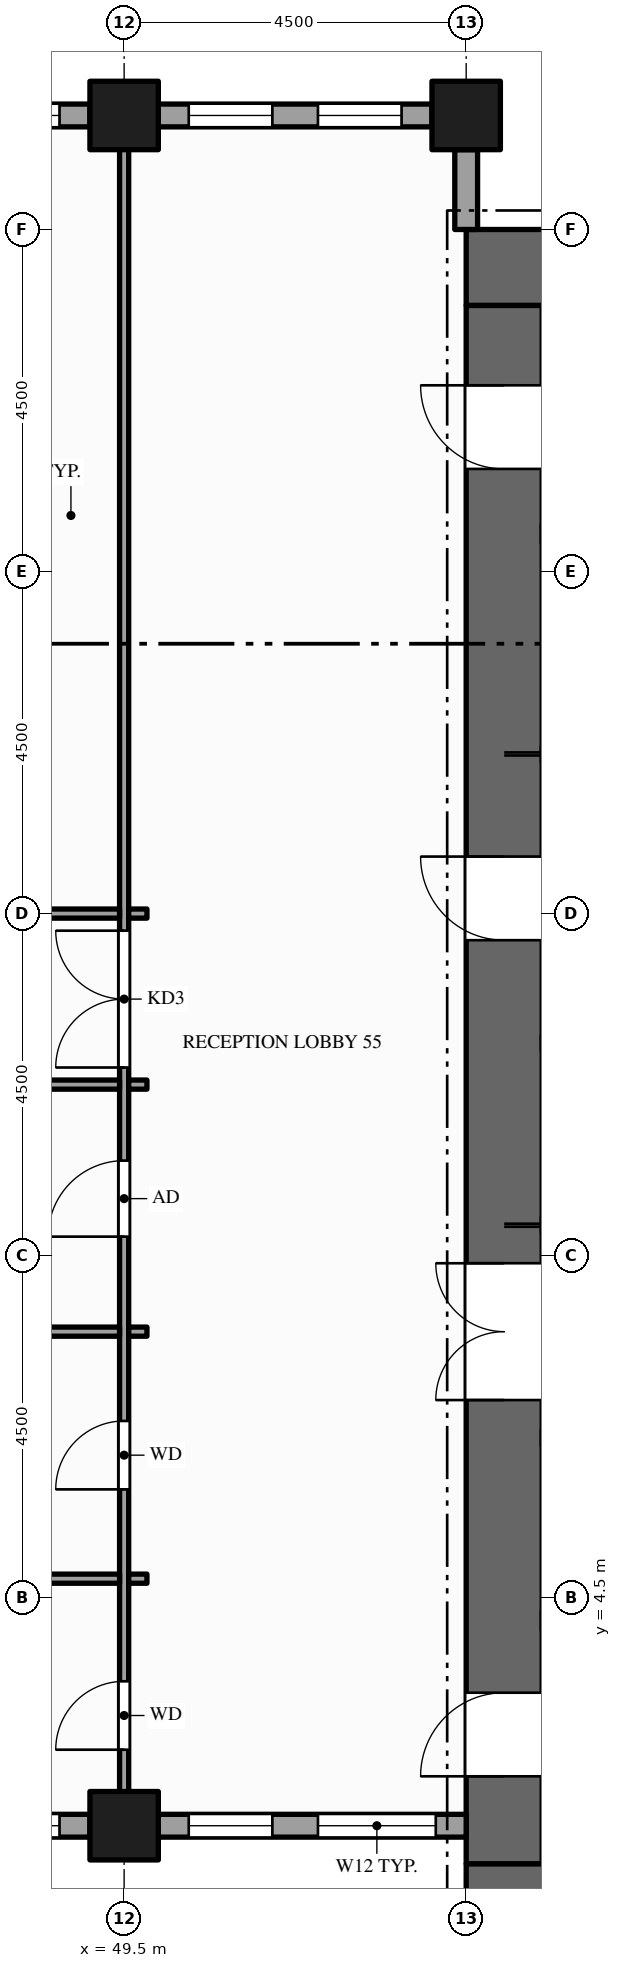
"""IFC4 building model, lengths in metres.
Left out: names, types, materials, properties, quantities, classifications, styles, units other than length and angle.
Written with IfcOpenShell. Run it as: python <this file> out.ifc"""

import sys

from ifc_helpers import new_model, si_unit, direction, frame, frame_2d, origin, origin_2d, place, context, subcontext, project, spatial, rectangle, hollow_rectangle, extrude, element, fill, save


model = new_model("IFC4")
c1 = context("Model", 3, precision=1e-05, world=origin(), true_north=direction((0.0, 1.0)))
c2 = subcontext(c1, "Body", "Model", "MODEL_VIEW")
j1 = project(units=[si_unit("LENGTHUNIT", "METRE"), si_unit("PLANEANGLEUNIT", "RADIAN")], contexts=[c1])
p1 = place(None, origin())
s1 = spatial("IfcSite", under=j1, at=p1, CompositionType="ELEMENT")
p2 = place(p1, origin())
s2 = spatial("IfcBuilding", under=s1, at=p2, CompositionType="ELEMENT")
p3 = place(p2, frame((0.0, 0.0, 155.0)))
s3 = spatial("IfcBuildingStorey", under=s2, at=p3, CompositionType="ELEMENT", Elevation=155.0)
for number, where, z_axis, x_axis in (
    (1, (67.5, 0.5, -0.15), (0.0, 0.0, 1.0), (-1.0, 0.0, 0.0)),
    (2, (54.0, 22.0, -0.15), (0.0, 0.0, 1.0), (1.0, 0.0, 0.0)),
):
    element("IfcWall", number, at=place(p3, frame(where, z_axis=z_axis, x_axis=x_axis)), inside=s3, PredefinedType="SHEAR", context=c2, shape_type="SweptSolid", body=[
        extrude(rectangle(XDim=13.5, YDim=1.0, at=frame_2d((6.75, 0.0))), origin(), (0.0, 0.0, 1.0), 4.0),
    ])
p4 = place(p3, frame((54.5, 1.0, -0.15), z_axis=(0.0, 0.0, 1.0), x_axis=(0.0, 1.0, 0.0)))
e3 = element("IfcWall", 3, at=p4, inside=s3, PredefinedType="SHEAR", context=c2, shape_type="SweptSolid", body=[
    extrude(rectangle(XDim=20.5, YDim=1.0, at=frame_2d((10.25, 0.0))), origin(), (0.0, 0.0, 1.0), 4.0),
])
p5 = place(p4, frame((6.1, 0.0, 0.15)))
e4 = element("IfcOpeningElement", 4, at=p5, cuts=e3, PredefinedType="OPENING", context=c2, shape_type="SweptSolid", body=[
    extrude(rectangle(XDim=1.8, YDim=2.1, at=frame_2d((0.9, 1.05))), frame((0.0, 0.51, 0.0), z_axis=(0.0, -1.0, 0.0), x_axis=(1.0, 0.0, 0.0)), (0.0, 0.0, 1.0), 1.02),
])
p6 = place(p4, frame((12.15, 0.0, 0.15)))
e5 = element("IfcOpeningElement", 5, at=p6, cuts=e3, PredefinedType="OPENING", context=c2, shape_type="SweptSolid", body=[
    extrude(rectangle(XDim=1.1, YDim=2.1, at=frame_2d((0.55, 1.05))), frame((0.0, 0.51, 0.0), z_axis=(0.0, -1.0, 0.0), x_axis=(1.0, 0.0, 0.0)), (0.0, 0.0, 1.0), 1.02),
])
p7 = place(p4, frame((1.15, 0.0, 0.15)))
e6 = element("IfcOpeningElement", 6, at=p7, cuts=e3, PredefinedType="OPENING", context=c2, shape_type="SweptSolid", body=[
    extrude(rectangle(XDim=1.1, YDim=2.1, at=frame_2d((0.55, 1.05))), frame((0.0, 0.51, 0.0), z_axis=(0.0, -1.0, 0.0), x_axis=(1.0, 0.0, 0.0)), (0.0, 0.0, 1.0), 1.02),
])
p8 = place(p4, frame((18.35, 0.0, 0.15)))
e7 = element("IfcOpeningElement", 7, at=p8, cuts=e3, PredefinedType="OPENING", context=c2, shape_type="SweptSolid", body=[
    extrude(rectangle(XDim=1.1, YDim=2.1, at=frame_2d((0.55, 1.05))), frame((0.0, 0.51, 0.0), z_axis=(0.0, -1.0, 0.0), x_axis=(1.0, 0.0, 0.0)), (0.0, 0.0, 1.0), 1.02),
])
for number, where, z_axis, x_axis in (
    (8, (49.5, 1.5, -0.15), (0.0, 0.0, 1.0), (1.0, 0.0, 0.0)),
    (9, (49.5, 24.0, -0.15), (0.0, 0.0, 1.0), (1.0, 0.0, 0.0)),
    (10, (54.0, 24.0, -0.15), (0.0, 0.0, 1.0), (1.0, 0.0, 0.0)),
):
    element("IfcColumn", number, at=place(p3, frame(where, z_axis=z_axis, x_axis=x_axis)), inside=s3, PredefinedType="COLUMN", context=c2, shape_type="SweptSolid", body=[
        extrude(hollow_rectangle(XDim=0.9, YDim=0.9, WallThickness=0.045, at=origin_2d()), origin(), (0.0, 0.0, 1.0), 4.0),
    ])
p9 = place(p3, frame((45.45, 1.5, 0.0), z_axis=(0.0, 0.0, 1.0), x_axis=(1.0, 0.0, 0.0)))
e11 = element("IfcWall", 11, at=p9, inside=s3, PredefinedType="STANDARD", context=c2, shape_type="SweptSolid", body=[
    extrude(rectangle(XDim=3.6, YDim=0.3, at=frame_2d((1.8, 0.0))), origin(), (0.0, 0.0, 1.0), 2.87),
])
p10 = place(p9, frame((0.4, 0.0, 0.9)))
e12 = element("IfcOpeningElement", 12, at=p10, cuts=e11, PredefinedType="OPENING", context=c2, shape_type="SweptSolid", body=[
    extrude(rectangle(XDim=1.1, YDim=1.75, at=frame_2d((0.55, 0.875))), frame((0.0, 0.16, 0.0), z_axis=(0.0, -1.0, 0.0), x_axis=(1.0, 0.0, 0.0)), (0.0, 0.0, 1.0), 0.32),
])
p11 = place(p9, frame((2.1, 0.0, 0.9)))
e13 = element("IfcOpeningElement", 13, at=p11, cuts=e11, PredefinedType="OPENING", context=c2, shape_type="SweptSolid", body=[
    extrude(rectangle(XDim=1.1, YDim=1.75, at=frame_2d((0.55, 0.875))), frame((0.0, 0.16, 0.0), z_axis=(0.0, -1.0, 0.0), x_axis=(1.0, 0.0, 0.0)), (0.0, 0.0, 1.0), 0.32),
])
p12 = place(p3, frame((49.95, 1.5, 0.0), z_axis=(0.0, 0.0, 1.0), x_axis=(1.0, 0.0, 0.0)))
e14 = element("IfcWall", 14, at=p12, inside=s3, PredefinedType="STANDARD", context=c2, shape_type="SweptSolid", body=[
    extrude(rectangle(XDim=4.05, YDim=0.3, at=frame_2d((2.025, 0.0))), origin(), (0.0, 0.0, 1.0), 2.87),
])
p13 = place(p12, frame((0.4, 0.0, 0.9)))
e15 = element("IfcOpeningElement", 15, at=p13, cuts=e14, PredefinedType="OPENING", context=c2, shape_type="SweptSolid", body=[
    extrude(rectangle(XDim=1.1, YDim=1.75, at=frame_2d((0.55, 0.875))), frame((0.0, 0.16, 0.0), z_axis=(0.0, -1.0, 0.0), x_axis=(1.0, 0.0, 0.0)), (0.0, 0.0, 1.0), 0.32),
])
p14 = place(p12, frame((2.1, 0.0, 0.9)))
e16 = element("IfcOpeningElement", 16, at=p14, cuts=e14, PredefinedType="OPENING", context=c2, shape_type="SweptSolid", body=[
    extrude(rectangle(XDim=1.55, YDim=1.75, at=frame_2d((0.775, 0.875))), frame((0.0, 0.16, 0.0), z_axis=(0.0, -1.0, 0.0), x_axis=(1.0, 0.0, 0.0)), (0.0, 0.0, 1.0), 0.32),
])
p15 = place(p3, frame((54.0, 22.5, 0.0), z_axis=(0.0, 0.0, 1.0), x_axis=(0.0, 1.0, 0.0)))
e17 = element("IfcWall", 17, at=p15, inside=s3, PredefinedType="STANDARD", context=c2, shape_type="SweptSolid", body=[
    extrude(rectangle(XDim=1.05, YDim=0.3, at=frame_2d((0.525, 0.0))), origin(), (0.0, 0.0, 1.0), 3.149),
])
p16 = place(p3, frame((53.55, 24.0, 0.0), z_axis=(0.0, 0.0, 1.0), x_axis=(-1.0, 0.0, 0.0)))
e18 = element("IfcWall", 18, at=p16, inside=s3, PredefinedType="STANDARD", context=c2, shape_type="SweptSolid", body=[
    extrude(rectangle(XDim=3.6, YDim=0.3, at=frame_2d((1.8, 0.0))), origin(), (0.0, 0.0, 1.0), 2.87),
])
p17 = place(p16, frame((0.4, 0.0, 0.9)))
e19 = element("IfcOpeningElement", 19, at=p17, cuts=e18, PredefinedType="OPENING", context=c2, shape_type="SweptSolid", body=[
    extrude(rectangle(XDim=1.1, YDim=1.75, at=frame_2d((0.55, 0.875))), frame((0.0, 0.16, 0.0), z_axis=(0.0, -1.0, 0.0), x_axis=(1.0, 0.0, 0.0)), (0.0, 0.0, 1.0), 0.32),
])
p18 = place(p16, frame((2.1, 0.0, 0.9)))
e20 = element("IfcOpeningElement", 20, at=p18, cuts=e18, PredefinedType="OPENING", context=c2, shape_type="SweptSolid", body=[
    extrude(rectangle(XDim=1.1, YDim=1.75, at=frame_2d((0.55, 0.875))), frame((0.0, 0.16, 0.0), z_axis=(0.0, -1.0, 0.0), x_axis=(1.0, 0.0, 0.0)), (0.0, 0.0, 1.0), 0.32),
])
p19 = place(p3, frame((49.05, 24.0, 0.0), z_axis=(0.0, 0.0, 1.0), x_axis=(-1.0, 0.0, 0.0)))
e21 = element("IfcWall", 21, at=p19, inside=s3, PredefinedType="STANDARD", context=c2, shape_type="SweptSolid", body=[
    extrude(rectangle(XDim=3.6, YDim=0.3, at=frame_2d((1.8, 0.0))), origin(), (0.0, 0.0, 1.0), 2.87),
])
p20 = place(p19, frame((0.4, 0.0, 0.9)))
e22 = element("IfcOpeningElement", 22, at=p20, cuts=e21, PredefinedType="OPENING", context=c2, shape_type="SweptSolid", body=[
    extrude(rectangle(XDim=1.1, YDim=1.75, at=frame_2d((0.55, 0.875))), frame((0.0, 0.16, 0.0), z_axis=(0.0, -1.0, 0.0), x_axis=(1.0, 0.0, 0.0)), (0.0, 0.0, 1.0), 0.32),
])
p21 = place(p19, frame((2.1, 0.0, 0.9)))
e23 = element("IfcOpeningElement", 23, at=p21, cuts=e21, PredefinedType="OPENING", context=c2, shape_type="SweptSolid", body=[
    extrude(rectangle(XDim=1.1, YDim=1.75, at=frame_2d((0.55, 0.875))), frame((0.0, 0.16, 0.0), z_axis=(0.0, -1.0, 0.0), x_axis=(1.0, 0.0, 0.0)), (0.0, 0.0, 1.0), 0.32),
])
p22 = place(p3, frame((49.5, 1.65, 0.0), z_axis=(0.0, 0.0, 1.0), x_axis=(0.0, 1.0, 0.0)))
e24 = element("IfcWall", 24, at=p22, inside=s3, PredefinedType="PARTITIONING", context=c2, shape_type="SweptSolid", body=[
    extrude(rectangle(XDim=22.2, YDim=0.12, at=frame_2d((11.1, 0.0))), origin(), (0.0, 0.0, 1.0), 2.87),
])
p23 = place(p22, frame((9.825, 0.0, 0.0)))
e25 = element("IfcOpeningElement", 25, at=p23, cuts=e24, PredefinedType="OPENING", context=c2, shape_type="SweptSolid", body=[
    extrude(rectangle(XDim=1.8, YDim=2.1, at=frame_2d((0.9, 1.05))), frame((0.0, 0.07, 0.0), z_axis=(0.0, -1.0, 0.0), x_axis=(1.0, 0.0, 0.0)), (0.0, 0.0, 1.0), 0.14),
])
p24 = place(p22, frame((0.85, 0.0, 0.0)))
e26 = element("IfcOpeningElement", 26, at=p24, cuts=e24, PredefinedType="OPENING", context=c2, shape_type="SweptSolid", body=[
    extrude(rectangle(XDim=0.9, YDim=2.1, at=frame_2d((0.45, 1.05))), frame((0.0, 0.07, 0.0), z_axis=(0.0, -1.0, 0.0), x_axis=(1.0, 0.0, 0.0)), (0.0, 0.0, 1.0), 0.14),
])
p25 = place(p22, frame((4.275, 0.0, 0.0)))
e27 = element("IfcOpeningElement", 27, at=p25, cuts=e24, PredefinedType="OPENING", context=c2, shape_type="SweptSolid", body=[
    extrude(rectangle(XDim=0.9, YDim=2.1, at=frame_2d((0.45, 1.05))), frame((0.0, 0.07, 0.0), z_axis=(0.0, -1.0, 0.0), x_axis=(1.0, 0.0, 0.0)), (0.0, 0.0, 1.0), 0.14),
])
p26 = place(p22, frame((7.6, 0.0, 0.0)))
e28 = element("IfcOpeningElement", 28, at=p26, cuts=e24, PredefinedType="OPENING", context=c2, shape_type="SweptSolid", body=[
    extrude(rectangle(XDim=1.0, YDim=2.1, at=frame_2d((0.5, 1.05))), frame((0.0, 0.07, 0.0), z_axis=(0.0, -1.0, 0.0), x_axis=(1.0, 0.0, 0.0)), (0.0, 0.0, 1.0), 0.14),
])
p27 = place(p3, frame((45.06, 4.75, 0.0), z_axis=(0.0, 0.0, 1.0), x_axis=(1.0, 0.0, 0.0)))
e29 = element("IfcWall", 29, at=p27, inside=s3, PredefinedType="PARTITIONING", context=c2, shape_type="SweptSolid", body=[
    extrude(rectangle(XDim=4.38, YDim=0.12, at=frame_2d((2.19, 0.0))), origin(), (0.0, 0.0, 1.0), 2.87),
])
p28 = place(p3, frame((49.56, 4.75, 0.0), z_axis=(0.0, 0.0, 1.0), x_axis=(1.0, 0.0, 0.0)))
e30 = element("IfcWall", 30, at=p28, inside=s3, PredefinedType="PARTITIONING", context=c2, shape_type="SweptSolid", body=[
    extrude(rectangle(XDim=0.24, YDim=0.12, at=frame_2d((0.12, 0.0))), origin(), (0.0, 0.0, 1.0), 2.87),
])
p29 = place(p3, frame((45.06, 8.0, 0.0), z_axis=(0.0, 0.0, 1.0), x_axis=(1.0, 0.0, 0.0)))
e31 = element("IfcWall", 31, at=p29, inside=s3, PredefinedType="PARTITIONING", context=c2, shape_type="SweptSolid", body=[
    extrude(rectangle(XDim=4.38, YDim=0.12, at=frame_2d((2.19, 0.0))), origin(), (0.0, 0.0, 1.0), 2.87),
])
p30 = place(p3, frame((49.56, 8.0, 0.0), z_axis=(0.0, 0.0, 1.0), x_axis=(1.0, 0.0, 0.0)))
e32 = element("IfcWall", 32, at=p30, inside=s3, PredefinedType="PARTITIONING", context=c2, shape_type="SweptSolid", body=[
    extrude(rectangle(XDim=0.24, YDim=0.12, at=frame_2d((0.12, 0.0))), origin(), (0.0, 0.0, 1.0), 2.87),
])
p31 = place(p3, frame((55.0, 9.4, 0.0), z_axis=(0.0, 0.0, 1.0), x_axis=(1.0, 0.0, 0.0)))
e33 = element("IfcWall", 33, at=p31, inside=s3, PredefinedType="SOLIDWALL", context=c2, shape_type="SweptSolid", body=[
    extrude(rectangle(XDim=2.3, YDim=0.2, at=frame_2d((1.15, 0.0))), origin(), (0.0, 0.0, 1.0), 3.85),
])
p32 = place(p31, frame((0.6, 0.0, 0.012)))
e34 = element("IfcOpeningElement", 34, at=p32, cuts=e33, PredefinedType="OPENING", context=c2, shape_type="SweptSolid", body=[
    extrude(rectangle(XDim=1.1, YDim=2.1, at=frame_2d((0.55, 1.05))), frame((0.0, 0.11, 0.0), z_axis=(0.0, -1.0, 0.0), x_axis=(1.0, 0.0, 0.0)), (0.0, 0.0, 1.0), 0.22),
])
p33 = place(p3, frame((45.06, 11.25, 0.0), z_axis=(0.0, 0.0, 1.0), x_axis=(1.0, 0.0, 0.0)))
e35 = element("IfcWall", 35, at=p33, inside=s3, PredefinedType="PARTITIONING", context=c2, shape_type="SweptSolid", body=[
    extrude(rectangle(XDim=4.38, YDim=0.12, at=frame_2d((2.19, 0.0))), origin(), (0.0, 0.0, 1.0), 2.87),
])
p34 = place(p3, frame((49.56, 11.25, 0.0), z_axis=(0.0, 0.0, 1.0), x_axis=(1.0, 0.0, 0.0)))
e36 = element("IfcWall", 36, at=p34, inside=s3, PredefinedType="PARTITIONING", context=c2, shape_type="SweptSolid", body=[
    extrude(rectangle(XDim=0.24, YDim=0.12, at=frame_2d((0.12, 0.0))), origin(), (0.0, 0.0, 1.0), 2.87),
])
p35 = place(p3, frame((55.0, 11.8, 0.0), z_axis=(0.0, 0.0, 1.0), x_axis=(1.0, 0.0, 0.0)))
e37 = element("IfcWall", 37, at=p35, inside=s3, PredefinedType="SOLIDWALL", context=c2, shape_type="SweptSolid", body=[
    extrude(rectangle(XDim=2.3, YDim=0.2, at=frame_2d((1.15, 0.0))), origin(), (0.0, 0.0, 1.0), 3.85),
])
p36 = place(p3, frame((45.06, 13.5, 0.0), z_axis=(0.0, 0.0, 1.0), x_axis=(1.0, 0.0, 0.0)))
e38 = element("IfcWall", 38, at=p36, inside=s3, PredefinedType="PARTITIONING", context=c2, shape_type="SweptSolid", body=[
    extrude(rectangle(XDim=4.38, YDim=0.12, at=frame_2d((2.19, 0.0))), origin(), (0.0, 0.0, 1.0), 2.87),
])
p37 = place(p36, frame((1.69, 0.0, 0.0)))
e39 = element("IfcOpeningElement", 39, at=p37, cuts=e38, PredefinedType="OPENING", context=c2, shape_type="SweptSolid", body=[
    extrude(rectangle(XDim=1.0, YDim=2.1, at=frame_2d((0.5, 1.05))), frame((0.0, 0.07, 0.0), z_axis=(0.0, -1.0, 0.0), x_axis=(1.0, 0.0, 0.0)), (0.0, 0.0, 1.0), 0.14),
])
p38 = place(p3, frame((49.56, 13.5, 0.0), z_axis=(0.0, 0.0, 1.0), x_axis=(1.0, 0.0, 0.0)))
e40 = element("IfcWall", 40, at=p38, inside=s3, PredefinedType="PARTITIONING", context=c2, shape_type="SweptSolid", body=[
    extrude(rectangle(XDim=0.24, YDim=0.12, at=frame_2d((0.12, 0.0))), origin(), (0.0, 0.0, 1.0), 2.87),
])
p39 = place(p3, frame((55.0, 15.6, 0.0), z_axis=(0.0, 0.0, 1.0), x_axis=(1.0, 0.0, 0.0)))
e41 = element("IfcWall", 41, at=p39, inside=s3, PredefinedType="SOLIDWALL", context=c2, shape_type="SweptSolid", body=[
    extrude(rectangle(XDim=2.3, YDim=0.2, at=frame_2d((1.15, 0.0))), origin(), (0.0, 0.0, 1.0), 3.85),
])
p40 = place(p39, frame((0.6, 0.0, 0.012)))
e42 = element("IfcOpeningElement", 42, at=p40, cuts=e41, PredefinedType="OPENING", context=c2, shape_type="SweptSolid", body=[
    extrude(rectangle(XDim=1.1, YDim=2.1, at=frame_2d((0.55, 1.05))), frame((0.0, 0.11, 0.0), z_axis=(0.0, -1.0, 0.0), x_axis=(1.0, 0.0, 0.0)), (0.0, 0.0, 1.0), 0.22),
])
p41 = place(p11, origin())
e43 = element("IfcWindow", 43, at=p41, inside=s3, PartitioningType="SINGLE_PANEL", PredefinedType="WINDOW", context=c2, shape_type="SweptSolid", body=[
    extrude(rectangle(XDim=1.1, YDim=1.75, at=frame_2d((0.55, 0.875))), frame((0.0, 0.03, 0.0), z_axis=(0.0, -1.0, 0.0), x_axis=(1.0, 0.0, 0.0)), (0.0, 0.0, 1.0), 0.06),
])
fill(e13, e43)
p42 = place(p13, origin())
e44 = element("IfcWindow", 44, at=p42, inside=s3, PartitioningType="SINGLE_PANEL", PredefinedType="WINDOW", context=c2, shape_type="SweptSolid", body=[
    extrude(rectangle(XDim=1.1, YDim=1.75, at=frame_2d((0.55, 0.875))), frame((0.0, 0.03, 0.0), z_axis=(0.0, -1.0, 0.0), x_axis=(1.0, 0.0, 0.0)), (0.0, 0.0, 1.0), 0.06),
])
fill(e15, e44)
p43 = place(p14, origin())
e45 = element("IfcWindow", 45, at=p43, inside=s3, PartitioningType="SINGLE_PANEL", PredefinedType="WINDOW", context=c2, shape_type="SweptSolid", body=[
    extrude(rectangle(XDim=1.55, YDim=1.75, at=frame_2d((0.775, 0.875))), frame((0.0, 0.03, 0.0), z_axis=(0.0, -1.0, 0.0), x_axis=(1.0, 0.0, 0.0)), (0.0, 0.0, 1.0), 0.06),
])
fill(e16, e45)
p44 = place(p17, origin())
e46 = element("IfcWindow", 46, at=p44, inside=s3, PartitioningType="SINGLE_PANEL", PredefinedType="WINDOW", context=c2, shape_type="SweptSolid", body=[
    extrude(rectangle(XDim=1.1, YDim=1.75, at=frame_2d((0.55, 0.875))), frame((0.0, 0.03, 0.0), z_axis=(0.0, -1.0, 0.0), x_axis=(1.0, 0.0, 0.0)), (0.0, 0.0, 1.0), 0.06),
])
fill(e19, e46)
p45 = place(p18, origin())
e47 = element("IfcWindow", 47, at=p45, inside=s3, PartitioningType="SINGLE_PANEL", PredefinedType="WINDOW", context=c2, shape_type="SweptSolid", body=[
    extrude(rectangle(XDim=1.1, YDim=1.75, at=frame_2d((0.55, 0.875))), frame((0.0, 0.03, 0.0), z_axis=(0.0, -1.0, 0.0), x_axis=(1.0, 0.0, 0.0)), (0.0, 0.0, 1.0), 0.06),
])
fill(e20, e47)
p46 = place(p20, origin())
e48 = element("IfcWindow", 48, at=p46, inside=s3, PartitioningType="SINGLE_PANEL", PredefinedType="WINDOW", context=c2, shape_type="SweptSolid", body=[
    extrude(rectangle(XDim=1.1, YDim=1.75, at=frame_2d((0.55, 0.875))), frame((0.0, 0.03, 0.0), z_axis=(0.0, -1.0, 0.0), x_axis=(1.0, 0.0, 0.0)), (0.0, 0.0, 1.0), 0.06),
])
fill(e22, e48)
p47 = place(p5, origin())
e49 = element("IfcDoor", 49, at=p47, inside=s3, OperationType="DOUBLE_DOOR_SINGLE_SWING", PredefinedType="DOOR", context=c2, shape_type="SweptSolid", body=[
    extrude(rectangle(XDim=1.8, YDim=2.1, at=frame_2d((0.9, 1.05))), frame((0.0, 0.025, 0.0), z_axis=(0.0, -1.0, 0.0), x_axis=(1.0, 0.0, 0.0)), (0.0, 0.0, 1.0), 0.05),
])
fill(e4, e49)
p48 = place(p6, origin())
e50 = element("IfcDoor", 50, at=p48, inside=s3, OperationType="SINGLE_SWING_RIGHT", PredefinedType="DOOR", context=c2, shape_type="SweptSolid", body=[
    extrude(rectangle(XDim=1.1, YDim=2.1, at=frame_2d((0.55, 1.05))), frame((0.0, 0.025, 0.0), z_axis=(0.0, -1.0, 0.0), x_axis=(1.0, 0.0, 0.0)), (0.0, 0.0, 1.0), 0.05),
])
fill(e5, e50)
p49 = place(p7, origin())
e51 = element("IfcDoor", 51, at=p49, inside=s3, OperationType="SINGLE_SWING_LEFT", PredefinedType="DOOR", context=c2, shape_type="SweptSolid", body=[
    extrude(rectangle(XDim=1.1, YDim=2.1, at=frame_2d((0.55, 1.05))), frame((0.0, 0.025, 0.0), z_axis=(0.0, -1.0, 0.0), x_axis=(1.0, 0.0, 0.0)), (0.0, 0.0, 1.0), 0.05),
])
fill(e6, e51)
p50 = place(p8, origin())
e52 = element("IfcDoor", 52, at=p50, inside=s3, OperationType="SINGLE_SWING_RIGHT", PredefinedType="DOOR", context=c2, shape_type="SweptSolid", body=[
    extrude(rectangle(XDim=1.1, YDim=2.1, at=frame_2d((0.55, 1.05))), frame((0.0, 0.025, 0.0), z_axis=(0.0, -1.0, 0.0), x_axis=(1.0, 0.0, 0.0)), (0.0, 0.0, 1.0), 0.05),
])
fill(e7, e52)
p51 = place(p23, origin())
e53 = element("IfcDoor", 53, at=p51, inside=s3, OperationType="DOUBLE_DOOR_SINGLE_SWING", PredefinedType="DOOR", context=c2, shape_type="SweptSolid", body=[
    extrude(rectangle(XDim=1.8, YDim=2.1, at=frame_2d((0.9, 1.05))), frame((0.0, 0.025, 0.0), z_axis=(0.0, -1.0, 0.0), x_axis=(1.0, 0.0, 0.0)), (0.0, 0.0, 1.0), 0.05),
])
fill(e25, e53)
p52 = place(p24, origin())
e54 = element("IfcDoor", 54, at=p52, inside=s3, OperationType="SINGLE_SWING_LEFT", PredefinedType="DOOR", context=c2, shape_type="SweptSolid", body=[
    extrude(rectangle(XDim=0.9, YDim=2.1, at=frame_2d((0.45, 1.05))), frame((0.0, 0.025, 0.0), z_axis=(0.0, -1.0, 0.0), x_axis=(1.0, 0.0, 0.0)), (0.0, 0.0, 1.0), 0.05),
])
fill(e26, e54)
p53 = place(p25, origin())
e55 = element("IfcDoor", 55, at=p53, inside=s3, OperationType="SINGLE_SWING_LEFT", PredefinedType="DOOR", context=c2, shape_type="SweptSolid", body=[
    extrude(rectangle(XDim=0.9, YDim=2.1, at=frame_2d((0.45, 1.05))), frame((0.0, 0.025, 0.0), z_axis=(0.0, -1.0, 0.0), x_axis=(1.0, 0.0, 0.0)), (0.0, 0.0, 1.0), 0.05),
])
fill(e27, e55)
p54 = place(p26, origin())
e56 = element("IfcDoor", 56, at=p54, inside=s3, OperationType="SINGLE_SWING_LEFT", PredefinedType="DOOR", context=c2, shape_type="SweptSolid", body=[
    extrude(rectangle(XDim=1.0, YDim=2.1, at=frame_2d((0.5, 1.05))), frame((0.0, 0.025, 0.0), z_axis=(0.0, -1.0, 0.0), x_axis=(1.0, 0.0, 0.0)), (0.0, 0.0, 1.0), 0.05),
])
fill(e28, e56)
save(model, sys.argv[1])
